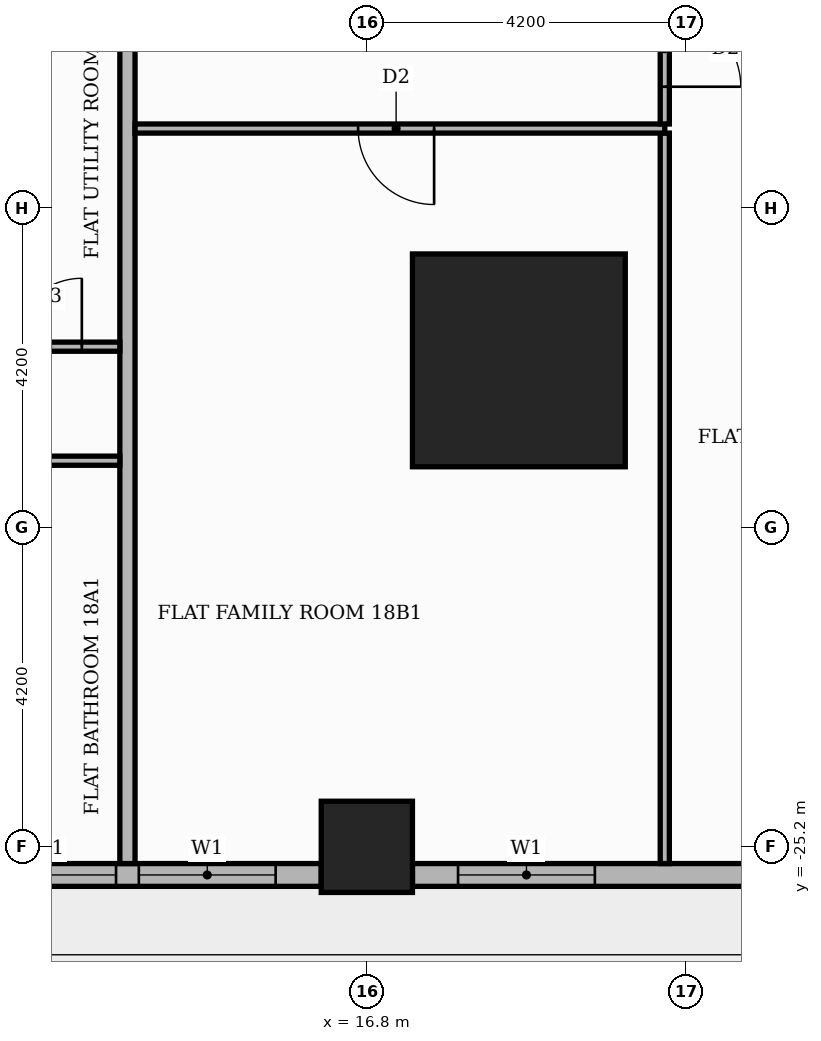
"""IFC4 building model, lengths in metres.
Left out: names, types, materials, properties, quantities, classifications, styles, units other than length and angle.
Written with IfcOpenShell. Run it as: python <this file> out.ifc"""

import sys

from ifc_helpers import new_model, si_unit, direction, frame, frame_2d, origin, origin_2d, place, context, subcontext, project, spatial, rectangle, extrude, element, fill, save


model = new_model("IFC4")
c1 = context("Model", 3, precision=1e-05, world=origin(), true_north=direction((0.0, 1.0)))
c2 = subcontext(c1, "Body", "Model", "MODEL_VIEW")
j1 = project(units=[si_unit("LENGTHUNIT", "METRE"), si_unit("PLANEANGLEUNIT", "RADIAN")], contexts=[c1])
p1 = place(None, origin())
s1 = spatial("IfcSite", under=j1, at=p1, CompositionType="ELEMENT")
p2 = place(p1, origin())
s2 = spatial("IfcBuilding", under=s1, at=p2, CompositionType="ELEMENT")
p3 = place(p2, frame((0.0, 0.0, 79.2)))
s3 = spatial("IfcBuildingStorey", under=s2, at=p3, CompositionType="ELEMENT", Elevation=79.2)
p4 = place(p3, frame((18.8, -18.8, 0.0), z_axis=(0.0, 0.0, 1.0), x_axis=(1.0, 0.0, 0.0)))
e1 = element("IfcColumn", 1, at=p4, inside=s3, PredefinedType="COLUMN", context=c2, shape_type="SweptSolid", body=[
    extrude(rectangle(XDim=2.8, YDim=2.8, at=origin_2d()), origin(), (0.0, 0.0, 1.0), 3.9),
])
p5 = place(p3, frame((16.8, -25.2, 0.0), z_axis=(0.0, 0.0, 1.0), x_axis=(1.0, 0.0, 0.0)))
e2 = element("IfcColumn", 2, at=p5, inside=s3, PredefinedType="COLUMN", context=c2, shape_type="SweptSolid", body=[
    extrude(rectangle(XDim=1.2, YDim=1.2, at=origin_2d()), origin(), (0.0, 0.0, 1.0), 3.9),
])
p6 = place(p3, frame((9.0, -25.57, 0.0), z_axis=(0.0, 0.0, 1.0), x_axis=(1.0, 0.0, 0.0)))
e3 = element("IfcWall", 3, at=p6, inside=s3, PredefinedType="STANDARD", context=c2, shape_type="SweptSolid", body=[
    extrude(rectangle(XDim=7.2, YDim=0.3, at=frame_2d((3.6, 0.0))), origin(), (0.0, 0.0, 1.0), 3.48),
])
p7 = place(p6, frame((0.6, 0.0, 0.9)))
e4 = element("IfcOpeningElement", 4, at=p7, cuts=e3, PredefinedType="OPENING", context=c2, shape_type="SweptSolid", body=[
    extrude(rectangle(XDim=1.8, YDim=2.1, at=frame_2d((0.9, 1.05))), frame((0.0, 0.16, 0.0), z_axis=(0.0, -1.0, 0.0), x_axis=(1.0, 0.0, 0.0)), (0.0, 0.0, 1.0), 0.32),
])
p8 = place(p6, frame((2.7, 0.0, 0.9)))
e5 = element("IfcOpeningElement", 5, at=p8, cuts=e3, PredefinedType="OPENING", context=c2, shape_type="SweptSolid", body=[
    extrude(rectangle(XDim=1.8, YDim=2.1, at=frame_2d((0.9, 1.05))), frame((0.0, 0.16, 0.0), z_axis=(0.0, -1.0, 0.0), x_axis=(1.0, 0.0, 0.0)), (0.0, 0.0, 1.0), 0.32),
])
p9 = place(p6, frame((4.8, 0.0, 0.9)))
e6 = element("IfcOpeningElement", 6, at=p9, cuts=e3, PredefinedType="OPENING", context=c2, shape_type="SweptSolid", body=[
    extrude(rectangle(XDim=1.8, YDim=2.1, at=frame_2d((0.9, 1.05))), frame((0.0, 0.16, 0.0), z_axis=(0.0, -1.0, 0.0), x_axis=(1.0, 0.0, 0.0)), (0.0, 0.0, 1.0), 0.32),
])
p10 = place(p3, frame((17.4, -25.57, 0.0), z_axis=(0.0, 0.0, 1.0), x_axis=(1.0, 0.0, 0.0)))
e7 = element("IfcWall", 7, at=p10, inside=s3, PredefinedType="STANDARD", context=c2, shape_type="SweptSolid", body=[
    extrude(rectangle(XDim=4.82, YDim=0.3, at=frame_2d((2.41, 0.0))), origin(), (0.0, 0.0, 1.0), 3.48),
])
p11 = place(p10, frame((0.6, 0.0, 0.9)))
e8 = element("IfcOpeningElement", 8, at=p11, cuts=e7, PredefinedType="OPENING", context=c2, shape_type="SweptSolid", body=[
    extrude(rectangle(XDim=1.8, YDim=2.1, at=frame_2d((0.9, 1.05))), frame((0.0, 0.16, 0.0), z_axis=(0.0, -1.0, 0.0), x_axis=(1.0, 0.0, 0.0)), (0.0, 0.0, 1.0), 0.32),
])
p12 = place(p3, frame((13.65, -25.42, 0.0), z_axis=(0.0, 0.0, 1.0), x_axis=(0.0, 1.0, 0.0)))
e9 = element("IfcWall", 9, at=p12, inside=s3, PredefinedType="PARTITIONING", context=c2, shape_type="SweptSolid", body=[
    extrude(rectangle(XDim=11.67, YDim=0.2, at=frame_2d((5.835, 0.0))), origin(), (0.0, 0.0, 1.0), 3.48),
])
p13 = place(p3, frame((20.72, -25.42, 0.0), z_axis=(0.0, 0.0, 1.0), x_axis=(0.0, 1.0, 0.0)))
e10 = element("IfcWall", 10, at=p13, inside=s3, PredefinedType="PARTITIONING", context=c2, shape_type="SweptSolid", body=[
    extrude(rectangle(XDim=9.61, YDim=0.12, at=frame_2d((4.805, 0.0))), origin(), (0.0, 0.0, 1.0), 3.48),
])
p14 = place(p3, frame((-17.4, -20.12, 0.0), z_axis=(0.0, 0.0, 1.0), x_axis=(1.0, 0.0, 0.0)))
e11 = element("IfcWall", 11, at=p14, inside=s3, PredefinedType="PARTITIONING", context=c2, shape_type="SweptSolid", body=[
    extrude(rectangle(XDim=30.95, YDim=0.12, at=frame_2d((15.475, 0.0))), origin(), (0.0, 0.0, 1.0), 3.48),
])
p15 = place(p14, frame((2.2, 0.0, 0.0)))
e12 = element("IfcOpeningElement", 12, at=p15, cuts=e11, PredefinedType="OPENING", context=c2, shape_type="SweptSolid", body=[
    extrude(rectangle(XDim=1.0, YDim=2.1, at=frame_2d((0.5, 1.05))), frame((0.0, 0.07, 0.0), z_axis=(0.0, -1.0, 0.0), x_axis=(1.0, 0.0, 0.0)), (0.0, 0.0, 1.0), 0.14),
])
p16 = place(p14, frame((5.4, 0.0, 0.0)))
e13 = element("IfcOpeningElement", 13, at=p16, cuts=e11, PredefinedType="OPENING", context=c2, shape_type="SweptSolid", body=[
    extrude(rectangle(XDim=0.9, YDim=2.1, at=frame_2d((0.45, 1.05))), frame((0.0, 0.07, 0.0), z_axis=(0.0, -1.0, 0.0), x_axis=(1.0, 0.0, 0.0)), (0.0, 0.0, 1.0), 0.14),
])
p17 = place(p14, frame((10.65, 0.0, 0.0)))
e14 = element("IfcOpeningElement", 14, at=p17, cuts=e11, PredefinedType="OPENING", context=c2, shape_type="SweptSolid", body=[
    extrude(rectangle(XDim=0.9, YDim=2.1, at=frame_2d((0.45, 1.05))), frame((0.0, 0.07, 0.0), z_axis=(0.0, -1.0, 0.0), x_axis=(1.0, 0.0, 0.0)), (0.0, 0.0, 1.0), 0.14),
])
p18 = place(p14, frame((20.1, 0.0, 0.0)))
e15 = element("IfcOpeningElement", 15, at=p18, cuts=e11, PredefinedType="OPENING", context=c2, shape_type="SweptSolid", body=[
    extrude(rectangle(XDim=0.9, YDim=2.1, at=frame_2d((0.45, 1.05))), frame((0.0, 0.07, 0.0), z_axis=(0.0, -1.0, 0.0), x_axis=(1.0, 0.0, 0.0)), (0.0, 0.0, 1.0), 0.14),
])
p19 = place(p14, frame((26.4, 0.0, 0.0)))
e16 = element("IfcOpeningElement", 16, at=p19, cuts=e11, PredefinedType="OPENING", context=c2, shape_type="SweptSolid", body=[
    extrude(rectangle(XDim=0.9, YDim=2.1, at=frame_2d((0.45, 1.05))), frame((0.0, 0.07, 0.0), z_axis=(0.0, -1.0, 0.0), x_axis=(1.0, 0.0, 0.0)), (0.0, 0.0, 1.0), 0.14),
])
p20 = place(p3, frame((-9.45, -18.62, 0.0), z_axis=(0.0, 0.0, 1.0), x_axis=(1.0, 0.0, 0.0)))
e17 = element("IfcWall", 17, at=p20, inside=s3, PredefinedType="PARTITIONING", context=c2, shape_type="SweptSolid", body=[
    extrude(rectangle(XDim=23.0, YDim=0.12, at=frame_2d((11.5, 0.0))), origin(), (0.0, 0.0, 1.0), 3.48),
])
p21 = place(p20, frame((2.7, 0.0, 0.0)))
e18 = element("IfcOpeningElement", 18, at=p21, cuts=e17, PredefinedType="OPENING", context=c2, shape_type="SweptSolid", body=[
    extrude(rectangle(XDim=0.9, YDim=2.1, at=frame_2d((0.45, 1.05))), frame((0.0, 0.07, 0.0), z_axis=(0.0, -1.0, 0.0), x_axis=(1.0, 0.0, 0.0)), (0.0, 0.0, 1.0), 0.14),
])
p22 = place(p20, frame((7.95, 0.0, 0.0)))
e19 = element("IfcOpeningElement", 19, at=p22, cuts=e17, PredefinedType="OPENING", context=c2, shape_type="SweptSolid", body=[
    extrude(rectangle(XDim=0.9, YDim=2.1, at=frame_2d((0.45, 1.05))), frame((0.0, 0.07, 0.0), z_axis=(0.0, -1.0, 0.0), x_axis=(1.0, 0.0, 0.0)), (0.0, 0.0, 1.0), 0.14),
])
p23 = place(p20, frame((11.1, 0.0, 0.0)))
e20 = element("IfcOpeningElement", 20, at=p23, cuts=e17, PredefinedType="OPENING", context=c2, shape_type="SweptSolid", body=[
    extrude(rectangle(XDim=0.9, YDim=2.1, at=frame_2d((0.45, 1.05))), frame((0.0, 0.07, 0.0), z_axis=(0.0, -1.0, 0.0), x_axis=(1.0, 0.0, 0.0)), (0.0, 0.0, 1.0), 0.14),
])
p24 = place(p20, frame((14.4, 0.0, 0.0)))
e21 = element("IfcOpeningElement", 21, at=p24, cuts=e17, PredefinedType="OPENING", context=c2, shape_type="SweptSolid", body=[
    extrude(rectangle(XDim=0.9, YDim=2.1, at=frame_2d((0.45, 1.05))), frame((0.0, 0.07, 0.0), z_axis=(0.0, -1.0, 0.0), x_axis=(1.0, 0.0, 0.0)), (0.0, 0.0, 1.0), 0.14),
])
p25 = place(p20, frame((18.6, 0.0, 0.0)))
e22 = element("IfcOpeningElement", 22, at=p25, cuts=e17, PredefinedType="OPENING", context=c2, shape_type="SweptSolid", body=[
    extrude(rectangle(XDim=0.9, YDim=2.1, at=frame_2d((0.45, 1.05))), frame((0.0, 0.07, 0.0), z_axis=(0.0, -1.0, 0.0), x_axis=(1.0, 0.0, 0.0)), (0.0, 0.0, 1.0), 0.14),
])
p26 = place(p20, frame((21.6, 0.0, 0.0)))
e23 = element("IfcOpeningElement", 23, at=p26, cuts=e17, PredefinedType="OPENING", context=c2, shape_type="SweptSolid", body=[
    extrude(rectangle(XDim=0.9, YDim=2.1, at=frame_2d((0.45, 1.05))), frame((0.0, 0.07, 0.0), z_axis=(0.0, -1.0, 0.0), x_axis=(1.0, 0.0, 0.0)), (0.0, 0.0, 1.0), 0.14),
])
p27 = place(p3, frame((13.75, -15.75, 0.0), z_axis=(0.0, 0.0, 1.0), x_axis=(1.0, 0.0, 0.0)))
e24 = element("IfcWall", 24, at=p27, inside=s3, PredefinedType="PARTITIONING", context=c2, shape_type="SweptSolid", body=[
    extrude(rectangle(XDim=6.97, YDim=0.12, at=frame_2d((3.485, 0.0))), origin(), (0.0, 0.0, 1.0), 3.48),
])
p28 = place(p27, frame((2.935, 0.0, 0.0)))
e25 = element("IfcOpeningElement", 25, at=p28, cuts=e24, PredefinedType="OPENING", context=c2, shape_type="SweptSolid", body=[
    extrude(rectangle(XDim=1.0, YDim=2.1, at=frame_2d((0.5, 1.05))), frame((0.0, 0.07, 0.0), z_axis=(0.0, -1.0, 0.0), x_axis=(1.0, 0.0, 0.0)), (0.0, 0.0, 1.0), 0.14),
])
p29 = place(p3, frame((20.72, -15.69, 0.0), z_axis=(0.0, 0.0, 1.0), x_axis=(0.0, 1.0, 0.0)))
e26 = element("IfcWall", 26, at=p29, inside=s3, PredefinedType="PARTITIONING", context=c2, shape_type="SweptSolid", body=[
    extrude(rectangle(XDim=1.98, YDim=0.12, at=frame_2d((0.99, 0.0))), origin(), (0.0, 0.0, 1.0), 3.48),
])
p30 = place(p29, frame((0.49, 0.0, 0.0)))
e27 = element("IfcOpeningElement", 27, at=p30, cuts=e26, PredefinedType="OPENING", context=c2, shape_type="SweptSolid", body=[
    extrude(rectangle(XDim=1.0, YDim=2.1, at=frame_2d((0.5, 1.05))), frame((0.0, 0.07, 0.0), z_axis=(0.0, -1.0, 0.0), x_axis=(1.0, 0.0, 0.0)), (0.0, 0.0, 1.0), 0.14),
])
p31 = place(p8, origin())
e28 = element("IfcWindow", 28, at=p31, inside=s3, PartitioningType="SINGLE_PANEL", PredefinedType="WINDOW", context=c2, shape_type="SweptSolid", body=[
    extrude(rectangle(XDim=1.8, YDim=2.1, at=frame_2d((0.9, 1.05))), frame((0.0, 0.03, 0.0), z_axis=(0.0, -1.0, 0.0), x_axis=(1.0, 0.0, 0.0)), (0.0, 0.0, 1.0), 0.06),
])
fill(e5, e28)
p32 = place(p9, origin())
e29 = element("IfcWindow", 29, at=p32, inside=s3, PartitioningType="SINGLE_PANEL", PredefinedType="WINDOW", context=c2, shape_type="SweptSolid", body=[
    extrude(rectangle(XDim=1.8, YDim=2.1, at=frame_2d((0.9, 1.05))), frame((0.0, 0.03, 0.0), z_axis=(0.0, -1.0, 0.0), x_axis=(1.0, 0.0, 0.0)), (0.0, 0.0, 1.0), 0.06),
])
fill(e6, e29)
p33 = place(p11, origin())
e30 = element("IfcWindow", 30, at=p33, inside=s3, PartitioningType="SINGLE_PANEL", PredefinedType="WINDOW", context=c2, shape_type="SweptSolid", body=[
    extrude(rectangle(XDim=1.8, YDim=2.1, at=frame_2d((0.9, 1.05))), frame((0.0, 0.03, 0.0), z_axis=(0.0, -1.0, 0.0), x_axis=(1.0, 0.0, 0.0)), (0.0, 0.0, 1.0), 0.06),
])
fill(e8, e30)
p34 = place(p26, origin())
e31 = element("IfcDoor", 31, at=p34, inside=s3, OperationType="SINGLE_SWING_RIGHT", PredefinedType="DOOR", context=c2, shape_type="SweptSolid", body=[
    extrude(rectangle(XDim=0.9, YDim=2.1, at=frame_2d((0.45, 1.05))), frame((0.0, 0.025, 0.0), z_axis=(0.0, -1.0, 0.0), x_axis=(1.0, 0.0, 0.0)), (0.0, 0.0, 1.0), 0.05),
])
fill(e23, e31)
p35 = place(p28, frame((1.0, 0.0, 0.0), z_axis=(0.0, 0.0, 1.0), x_axis=(-1.0, 0.0, 0.0)))
e32 = element("IfcDoor", 32, at=p35, inside=s3, OperationType="SINGLE_SWING_RIGHT", PredefinedType="DOOR", context=c2, shape_type="SweptSolid", body=[
    extrude(rectangle(XDim=1.0, YDim=2.1, at=frame_2d((0.5, 1.05))), frame((0.0, 0.025, 0.0), z_axis=(0.0, -1.0, 0.0), x_axis=(1.0, 0.0, 0.0)), (0.0, 0.0, 1.0), 0.05),
])
fill(e25, e32)
p36 = place(p30, frame((1.0, 0.0, 0.0), z_axis=(0.0, 0.0, 1.0), x_axis=(-1.0, 0.0, 0.0)))
e33 = element("IfcDoor", 33, at=p36, inside=s3, OperationType="SINGLE_SWING_LEFT", PredefinedType="DOOR", context=c2, shape_type="SweptSolid", body=[
    extrude(rectangle(XDim=1.0, YDim=2.1, at=frame_2d((0.5, 1.05))), frame((0.0, 0.025, 0.0), z_axis=(0.0, -1.0, 0.0), x_axis=(1.0, 0.0, 0.0)), (0.0, 0.0, 1.0), 0.05),
])
fill(e27, e33)
save(model, sys.argv[1])
